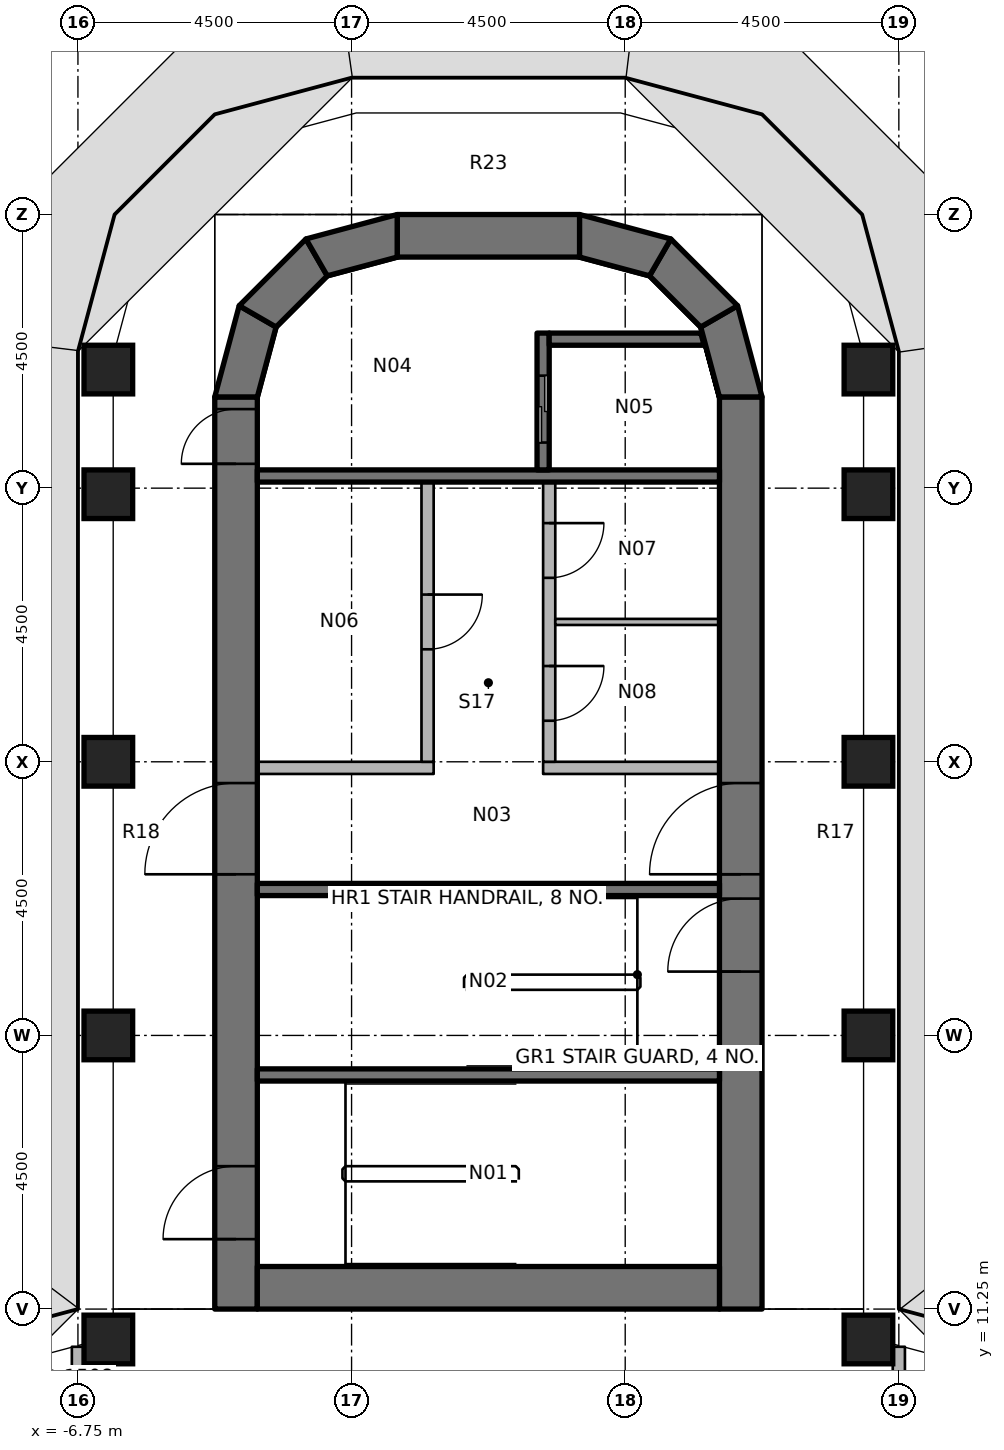
"""IFC4 building model, lengths in metres.
Left out: names, types, materials, properties, quantities, classifications, styles, units other than length and angle.
Written with IfcOpenShell. Run it as: python <this file> out.ifc"""

import sys

from ifc_helpers import new_model, si_unit, direction, frame, frame_2d, origin, origin_2d, place, context, subcontext, project, spatial, polyline, rectangle, outline, extrude, element, fill, save


model = new_model("IFC4")
c1 = context("Model", 3, precision=1e-05, world=origin(), true_north=direction((0.0, 1.0)))
c2 = subcontext(c1, "Body", "Model", "MODEL_VIEW")
j1 = project(units=[si_unit("LENGTHUNIT", "METRE"), si_unit("PLANEANGLEUNIT", "RADIAN")], contexts=[c1])
p1 = place(None, origin())
s1 = spatial("IfcSite", under=j1, at=p1, CompositionType="ELEMENT")
p2 = place(p1, origin())
s2 = spatial("IfcBuilding", under=s1, at=p2, CompositionType="ELEMENT")
p3 = place(p2, frame((0.0, 0.0, 144.8)))
s3 = spatial("IfcBuildingStorey", under=s2, at=p3, CompositionType="ELEMENT", Elevation=144.8)
for number, where, z_axis, x_axis in (
    (1, (-6.25, 10.75, 0.0), (0.0, 0.0, 1.0), (1.0, 0.0, 0.0)),
    (2, (-6.25, 15.75, 0.0), (0.0, 0.0, 1.0), (1.0, 0.0, 0.0)),
    (3, (-6.25, 20.25, 0.0), (0.0, 0.0, 1.0), (1.0, 0.0, 0.0)),
    (4, (-6.25, 24.65, 0.0), (0.0, 0.0, 1.0), (1.0, 0.0, 0.0)),
    (5, (-6.25, 26.7, 0.0), (0.0, 0.0, 1.0), (1.0, 0.0, 0.0)),
    (6, (6.25, 10.75, 0.0), (0.0, 0.0, 1.0), (1.0, 0.0, 0.0)),
    (7, (6.25, 15.75, 0.0), (0.0, 0.0, 1.0), (1.0, 0.0, 0.0)),
    (8, (6.25, 20.25, 0.0), (0.0, 0.0, 1.0), (1.0, 0.0, 0.0)),
    (9, (6.25, 24.65, 0.0), (0.0, 0.0, 1.0), (1.0, 0.0, 0.0)),
    (10, (6.25, 26.7, 0.0), (0.0, 0.0, 1.0), (1.0, 0.0, 0.0)),
):
    element("IfcColumn", number, at=place(p3, frame(where, z_axis=z_axis, x_axis=x_axis)), inside=s3, PredefinedType="COLUMN", context=c2, shape_type="SweptSolid", body=[
        extrude(rectangle(XDim=0.8, YDim=0.8, at=origin_2d()), origin(), (0.0, 0.0, 1.0), 3.65),
    ])
p4 = place(p3, frame((-4.15, 11.25, 0.0), z_axis=(0.0, 0.0, 1.0), x_axis=(0.0, 1.0, 0.0)))
e11 = element("IfcWall", 11, at=p4, inside=s3, PredefinedType="SHEAR", context=c2, shape_type="SweptSolid", body=[
    extrude(rectangle(XDim=15.0, YDim=0.7, at=frame_2d((7.5, 0.0))), origin(), (0.0, 0.0, 1.0), 3.8),
])
p5 = place(p4, frame((7.15, 0.0, 0.0)))
e12 = element("IfcOpeningElement", 12, at=p5, cuts=e11, PredefinedType="OPENING", context=c2, shape_type="SweptSolid", body=[
    extrude(rectangle(XDim=1.5, YDim=2.3, at=frame_2d((0.75, 1.15))), frame((0.0, 0.36, 0.0), z_axis=(0.0, -1.0, 0.0), x_axis=(1.0, 0.0, 0.0)), (0.0, 0.0, 1.0), 0.72),
])
p6 = place(p4, frame((13.9, 0.0, 0.0)))
e13 = element("IfcOpeningElement", 13, at=p6, cuts=e11, PredefinedType="OPENING", context=c2, shape_type="SweptSolid", body=[
    extrude(rectangle(XDim=0.9, YDim=2.1, at=frame_2d((0.45, 1.05))), frame((0.0, 0.36, 0.0), z_axis=(0.0, -1.0, 0.0), x_axis=(1.0, 0.0, 0.0)), (0.0, 0.0, 1.0), 0.72),
])
p7 = place(p4, frame((1.15, 0.0, 0.0)))
e14 = element("IfcOpeningElement", 14, at=p7, cuts=e11, PredefinedType="OPENING", context=c2, shape_type="SweptSolid", body=[
    extrude(rectangle(XDim=1.2, YDim=2.1, at=frame_2d((0.6, 1.05))), frame((0.0, 0.36, 0.0), z_axis=(0.0, -1.0, 0.0), x_axis=(1.0, 0.0, 0.0)), (0.0, 0.0, 1.0), 0.72),
])
p8 = place(p3, frame((4.15, 11.25, 0.0), z_axis=(0.0, 0.0, 1.0), x_axis=(0.0, 1.0, 0.0)))
e15 = element("IfcWall", 15, at=p8, inside=s3, PredefinedType="SHEAR", context=c2, shape_type="SweptSolid", body=[
    extrude(rectangle(XDim=15.0, YDim=0.7, at=frame_2d((7.5, 0.0))), origin(), (0.0, 0.0, 1.0), 3.8),
])
p9 = place(p8, frame((7.15, 0.0, 0.0)))
e16 = element("IfcOpeningElement", 16, at=p9, cuts=e15, PredefinedType="OPENING", context=c2, shape_type="SweptSolid", body=[
    extrude(rectangle(XDim=1.5, YDim=2.3, at=frame_2d((0.75, 1.15))), frame((0.0, 0.36, 0.0), z_axis=(0.0, -1.0, 0.0), x_axis=(1.0, 0.0, 0.0)), (0.0, 0.0, 1.0), 0.72),
])
p10 = place(p8, frame((5.55, 0.0, 0.0)))
e17 = element("IfcOpeningElement", 17, at=p10, cuts=e15, PredefinedType="OPENING", context=c2, shape_type="SweptSolid", body=[
    extrude(rectangle(XDim=1.2, YDim=2.1, at=frame_2d((0.6, 1.05))), frame((0.0, 0.36, 0.0), z_axis=(0.0, -1.0, 0.0), x_axis=(1.0, 0.0, 0.0)), (0.0, 0.0, 1.0), 0.72),
])
p11 = place(p3, frame((-3.8, 11.6, 0.0), z_axis=(0.0, 0.0, 1.0), x_axis=(1.0, 0.0, 0.0)))
e18 = element("IfcWall", 18, at=p11, inside=s3, PredefinedType="SHEAR", context=c2, shape_type="SweptSolid", body=[
    extrude(rectangle(XDim=7.6, YDim=0.7, at=frame_2d((3.8, 0.0))), origin(), (0.0, 0.0, 1.0), 3.8),
])
p12 = place(p3, frame((-1.5, 28.9, 0.0), z_axis=(0.0, 0.0, 1.0), x_axis=(1.0, 0.0, 0.0)))
e19 = element("IfcWall", 19, at=p12, inside=s3, PredefinedType="SHEAR", context=c2, shape_type="SweptSolid", body=[
    extrude(rectangle(XDim=3.0, YDim=0.7, at=frame_2d((1.5, 0.0))), origin(), (0.0, 0.0, 1.0), 3.8),
])
p13 = place(p3, origin())
e20 = element("IfcWall", 20, at=p13, inside=s3, PredefinedType="SHEAR", context=c2, shape_type="SweptSolid", body=[
    extrude(outline(polyline([(-4.5, 26.25), (-4.098, 27.75), (-3.492, 27.4), (-3.8, 26.25), (-4.5, 26.25)])), origin(), (0.0, 0.0, 1.0), 3.8),
])
p14 = place(p3, origin())
e21 = element("IfcWall", 21, at=p14, inside=s3, PredefinedType="SHEAR", context=c2, shape_type="SweptSolid", body=[
    extrude(outline(polyline([(-4.098, 27.75), (-3.0, 28.848), (-2.65, 28.242), (-3.492, 27.4), (-4.098, 27.75)])), origin(), (0.0, 0.0, 1.0), 3.8),
])
p15 = place(p3, origin())
e22 = element("IfcWall", 22, at=p15, inside=s3, PredefinedType="SHEAR", context=c2, shape_type="SweptSolid", body=[
    extrude(outline(polyline([(-3.0, 28.848), (-1.5, 29.25), (-1.5, 28.55), (-2.65, 28.242), (-3.0, 28.848)])), origin(), (0.0, 0.0, 1.0), 3.8),
])
p16 = place(p3, origin())
e23 = element("IfcWall", 23, at=p16, inside=s3, PredefinedType="SHEAR", context=c2, shape_type="SweptSolid", body=[
    extrude(outline(polyline([(4.5, 26.25), (4.098, 27.75), (3.492, 27.4), (3.8, 26.25), (4.5, 26.25)])), origin(), (0.0, 0.0, 1.0), 3.8),
])
p17 = place(p3, origin())
e24 = element("IfcWall", 24, at=p17, inside=s3, PredefinedType="SHEAR", context=c2, shape_type="SweptSolid", body=[
    extrude(outline(polyline([(4.098, 27.75), (3.0, 28.848), (2.65, 28.242), (3.492, 27.4), (4.098, 27.75)])), origin(), (0.0, 0.0, 1.0), 3.8),
])
p18 = place(p3, origin())
e25 = element("IfcWall", 25, at=p18, inside=s3, PredefinedType="SHEAR", context=c2, shape_type="SweptSolid", body=[
    extrude(outline(polyline([(3.0, 28.848), (1.5, 29.25), (1.5, 28.55), (2.65, 28.242), (3.0, 28.848)])), origin(), (0.0, 0.0, 1.0), 3.8),
])
p19 = place(p3, frame((-3.8, 24.95, 0.0), z_axis=(0.0, 0.0, 1.0), x_axis=(1.0, 0.0, 0.0)))
e26 = element("IfcWall", 26, at=p19, inside=s3, PredefinedType="SHEAR", context=c2, shape_type="SweptSolid", body=[
    extrude(rectangle(XDim=7.6, YDim=0.2, at=frame_2d((3.8, 0.0))), origin(), (0.0, 0.0, 1.0), 3.65),
])
p20 = place(p3, frame((0.9, 27.3, 0.0), z_axis=(0.0, 0.0, 1.0), x_axis=(0.0, -1.0, 0.0)))
e27 = element("IfcWall", 27, at=p20, inside=s3, PredefinedType="SHEAR", context=c2, shape_type="SweptSolid", body=[
    extrude(rectangle(XDim=2.25, YDim=0.2, at=frame_2d((1.125, 0.0))), origin(), (0.0, 0.0, 1.0), 3.65),
])
p21 = place(p20, frame((0.7, 0.0, 0.0)))
e28 = element("IfcOpeningElement", 28, at=p21, cuts=e27, PredefinedType="OPENING", context=c2, shape_type="SweptSolid", body=[
    extrude(rectangle(XDim=1.1, YDim=2.3, at=frame_2d((0.55, 1.15))), frame((0.0, 0.11, 0.0), z_axis=(0.0, -1.0, 0.0), x_axis=(1.0, 0.0, 0.0)), (0.0, 0.0, 1.0), 0.22),
])
p22 = place(p3, origin())
e29 = element("IfcWall", 29, at=p22, inside=s3, PredefinedType="SHEAR", context=c2, shape_type="SweptSolid", body=[
    extrude(outline(polyline([(1.0, 27.1), (3.548, 27.1), (3.494, 27.3), (1.0, 27.3), (1.0, 27.1)])), origin(), (0.0, 0.0, 1.0), 3.65),
])
for number, where, z_axis, x_axis in (
    (30, (-3.8, 18.15, 0.0), (0.0, 0.0, 1.0), (1.0, 0.0, 0.0)),
    (31, (-3.8, 15.1, 0.0), (0.0, 0.0, 1.0), (1.0, 0.0, 0.0)),
):
    element("IfcWall", number, at=place(p3, frame(where, z_axis=z_axis, x_axis=x_axis)), inside=s3, PredefinedType="SHEAR", context=c2, shape_type="SweptSolid", body=[
        extrude(rectangle(XDim=7.6, YDim=0.2, at=frame_2d((3.8, 0.0))), origin(), (0.0, 0.0, 1.0), 3.65),
    ])
p23 = place(p3, frame((-3.8, 20.15, 0.0), z_axis=(0.0, 0.0, 1.0), x_axis=(1.0, 0.0, 0.0)))
e32 = element("IfcWall", 32, at=p23, inside=s3, PredefinedType="PARTITIONING", context=c2, shape_type="SweptSolid", body=[
    extrude(rectangle(XDim=2.9, YDim=0.2, at=frame_2d((1.45, 0.0))), origin(), (0.0, 0.0, 1.0), 3.65),
])
p24 = place(p3, frame((-1.0, 24.85, 0.0), z_axis=(0.0, 0.0, 1.0), x_axis=(0.0, -1.0, 0.0)))
e33 = element("IfcWall", 33, at=p24, inside=s3, PredefinedType="PARTITIONING", context=c2, shape_type="SweptSolid", body=[
    extrude(rectangle(XDim=4.6, YDim=0.2, at=frame_2d((2.3, 0.0))), origin(), (0.0, 0.0, 1.0), 3.65),
])
p25 = place(p24, frame((1.85, 0.0, 0.0)))
e34 = element("IfcOpeningElement", 34, at=p25, cuts=e33, PredefinedType="OPENING", context=c2, shape_type="SweptSolid", body=[
    extrude(rectangle(XDim=0.9, YDim=2.1, at=frame_2d((0.45, 1.05))), frame((0.0, 0.11, 0.0), z_axis=(0.0, -1.0, 0.0), x_axis=(1.0, 0.0, 0.0)), (0.0, 0.0, 1.0), 0.22),
])
p26 = place(p3, frame((0.9, 20.15, 0.0), z_axis=(0.0, 0.0, 1.0), x_axis=(1.0, 0.0, 0.0)))
e35 = element("IfcWall", 35, at=p26, inside=s3, PredefinedType="PARTITIONING", context=c2, shape_type="SweptSolid", body=[
    extrude(rectangle(XDim=2.9, YDim=0.2, at=frame_2d((1.45, 0.0))), origin(), (0.0, 0.0, 1.0), 3.65),
])
p27 = place(p3, frame((1.0, 24.85, 0.0), z_axis=(0.0, 0.0, 1.0), x_axis=(0.0, -1.0, 0.0)))
e36 = element("IfcWall", 36, at=p27, inside=s3, PredefinedType="PARTITIONING", context=c2, shape_type="SweptSolid", body=[
    extrude(rectangle(XDim=4.6, YDim=0.2, at=frame_2d((2.3, 0.0))), origin(), (0.0, 0.0, 1.0), 3.65),
])
p28 = place(p27, frame((0.675, 0.0, 0.0)))
e37 = element("IfcOpeningElement", 37, at=p28, cuts=e36, PredefinedType="OPENING", context=c2, shape_type="SweptSolid", body=[
    extrude(rectangle(XDim=0.9, YDim=2.1, at=frame_2d((0.45, 1.05))), frame((0.0, 0.11, 0.0), z_axis=(0.0, -1.0, 0.0), x_axis=(1.0, 0.0, 0.0)), (0.0, 0.0, 1.0), 0.22),
])
p29 = place(p27, frame((3.025, 0.0, 0.0)))
e38 = element("IfcOpeningElement", 38, at=p29, cuts=e36, PredefinedType="OPENING", context=c2, shape_type="SweptSolid", body=[
    extrude(rectangle(XDim=0.9, YDim=2.1, at=frame_2d((0.45, 1.05))), frame((0.0, 0.11, 0.0), z_axis=(0.0, -1.0, 0.0), x_axis=(1.0, 0.0, 0.0)), (0.0, 0.0, 1.0), 0.22),
])
p30 = place(p3, frame((1.1, 22.55, 0.0), z_axis=(0.0, 0.0, 1.0), x_axis=(1.0, 0.0, 0.0)))
e39 = element("IfcWall", 39, at=p30, inside=s3, PredefinedType="PARTITIONING", context=c2, shape_type="SweptSolid", body=[
    extrude(rectangle(XDim=2.7, YDim=0.1, at=frame_2d((1.35, 0.0))), origin(), (0.0, 0.0, 1.0), 3.65),
])
p31 = place(p3, frame((6.75, 6.85, 0.0), z_axis=(0.0, 0.0, 1.0), x_axis=(0.0, 1.0, 0.0)))
e40 = element("IfcWall", 40, at=p31, inside=s3, PredefinedType="PARTITIONING", context=c2, shape_type="SweptSolid", body=[
    extrude(rectangle(XDim=3.78, YDim=0.2, at=frame_2d((1.89, 0.0))), origin(), (0.0, 0.0, 1.0), 2.75),
])
p32 = place(p3, frame((-6.75, 6.85, 0.0), z_axis=(0.0, 0.0, 1.0), x_axis=(0.0, 1.0, 0.0)))
e41 = element("IfcWall", 41, at=p32, inside=s3, PredefinedType="PARTITIONING", context=c2, shape_type="SweptSolid", body=[
    extrude(rectangle(XDim=3.78, YDim=0.2, at=frame_2d((1.89, 0.0))), origin(), (0.0, 0.0, 1.0), 2.75),
])
p33 = place(p32, frame((1.44, 0.0, 0.0)))
e42 = element("IfcOpeningElement", 42, at=p33, cuts=e41, PredefinedType="OPENING", context=c2, shape_type="SweptSolid", body=[
    extrude(rectangle(XDim=0.9, YDim=2.1, at=frame_2d((0.45, 1.05))), frame((0.0, 0.11, 0.0), z_axis=(0.0, -1.0, 0.0), x_axis=(1.0, 0.0, 0.0)), (0.0, 0.0, 1.0), 0.22),
])
p34 = place(p5, origin())
e43 = element("IfcDoor", 43, at=p34, inside=s3, OperationType="DOUBLE_DOOR_SINGLE_SWING", PredefinedType="DOOR", context=c2, shape_type="SweptSolid", body=[
    extrude(rectangle(XDim=1.5, YDim=2.3, at=frame_2d((0.75, 1.15))), frame((0.0, 0.025, 0.0), z_axis=(0.0, -1.0, 0.0), x_axis=(1.0, 0.0, 0.0)), (0.0, 0.0, 1.0), 0.05),
])
fill(e12, e43)
p35 = place(p9, origin())
e44 = element("IfcDoor", 44, at=p35, inside=s3, OperationType="DOUBLE_DOOR_SINGLE_SWING", PredefinedType="DOOR", context=c2, shape_type="SweptSolid", body=[
    extrude(rectangle(XDim=1.5, YDim=2.3, at=frame_2d((0.75, 1.15))), frame((0.0, 0.025, 0.0), z_axis=(0.0, -1.0, 0.0), x_axis=(1.0, 0.0, 0.0)), (0.0, 0.0, 1.0), 0.05),
])
fill(e16, e44)
p36 = place(p6, origin())
e45 = element("IfcDoor", 45, at=p36, inside=s3, OperationType="SINGLE_SWING_LEFT", PredefinedType="DOOR", context=c2, shape_type="SweptSolid", body=[
    extrude(rectangle(XDim=0.9, YDim=2.1, at=frame_2d((0.45, 1.05))), frame((0.0, 0.025, 0.0), z_axis=(0.0, -1.0, 0.0), x_axis=(1.0, 0.0, 0.0)), (0.0, 0.0, 1.0), 0.05),
])
fill(e13, e45)
p37 = place(p10, origin())
e46 = element("IfcDoor", 46, at=p37, inside=s3, OperationType="SINGLE_SWING_RIGHT", PredefinedType="DOOR", context=c2, shape_type="SweptSolid", body=[
    extrude(rectangle(XDim=1.2, YDim=2.1, at=frame_2d((0.6, 1.05))), frame((0.0, 0.025, 0.0), z_axis=(0.0, -1.0, 0.0), x_axis=(1.0, 0.0, 0.0)), (0.0, 0.0, 1.0), 0.05),
])
fill(e17, e46)
p38 = place(p7, origin())
e47 = element("IfcDoor", 47, at=p38, inside=s3, OperationType="SINGLE_SWING_LEFT", PredefinedType="DOOR", context=c2, shape_type="SweptSolid", body=[
    extrude(rectangle(XDim=1.2, YDim=2.1, at=frame_2d((0.6, 1.05))), frame((0.0, 0.025, 0.0), z_axis=(0.0, -1.0, 0.0), x_axis=(1.0, 0.0, 0.0)), (0.0, 0.0, 1.0), 0.05),
])
fill(e14, e47)
p39 = place(p21, origin())
e48 = element("IfcDoor", 48, at=p39, inside=s3, OperationType="DOUBLE_DOOR_SLIDING", PredefinedType="DOOR", context=c2, shape_type="SweptSolid", body=[
    extrude(rectangle(XDim=1.1, YDim=2.3, at=frame_2d((0.55, 1.15))), frame((0.0, 0.025, 0.0), z_axis=(0.0, -1.0, 0.0), x_axis=(1.0, 0.0, 0.0)), (0.0, 0.0, 1.0), 0.05),
])
fill(e28, e48)
p40 = place(p25, origin())
e49 = element("IfcDoor", 49, at=p40, inside=s3, OperationType="SINGLE_SWING_RIGHT", PredefinedType="DOOR", context=c2, shape_type="SweptSolid", body=[
    extrude(rectangle(XDim=0.9, YDim=2.1, at=frame_2d((0.45, 1.05))), frame((0.0, 0.025, 0.0), z_axis=(0.0, -1.0, 0.0), x_axis=(1.0, 0.0, 0.0)), (0.0, 0.0, 1.0), 0.05),
])
fill(e34, e49)
p41 = place(p28, origin())
e50 = element("IfcDoor", 50, at=p41, inside=s3, OperationType="SINGLE_SWING_RIGHT", PredefinedType="DOOR", context=c2, shape_type="SweptSolid", body=[
    extrude(rectangle(XDim=0.9, YDim=2.1, at=frame_2d((0.45, 1.05))), frame((0.0, 0.025, 0.0), z_axis=(0.0, -1.0, 0.0), x_axis=(1.0, 0.0, 0.0)), (0.0, 0.0, 1.0), 0.05),
])
fill(e37, e50)
p42 = place(p29, origin())
e51 = element("IfcDoor", 51, at=p42, inside=s3, OperationType="SINGLE_SWING_RIGHT", PredefinedType="DOOR", context=c2, shape_type="SweptSolid", body=[
    extrude(rectangle(XDim=0.9, YDim=2.1, at=frame_2d((0.45, 1.05))), frame((0.0, 0.025, 0.0), z_axis=(0.0, -1.0, 0.0), x_axis=(1.0, 0.0, 0.0)), (0.0, 0.0, 1.0), 0.05),
])
fill(e38, e51)
save(model, sys.argv[1])
